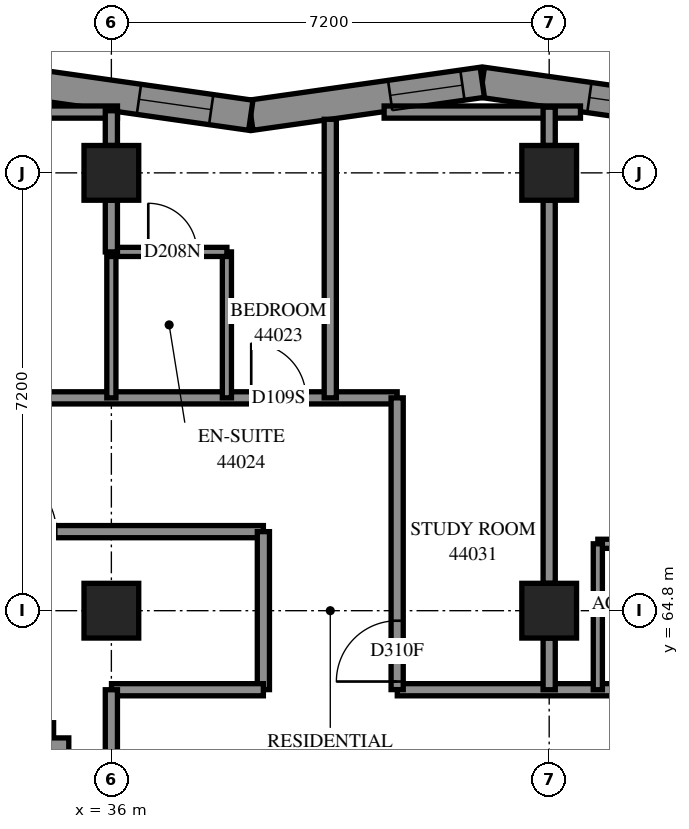
"""IFC4 building model, lengths in metres.
Left out: names, types, materials, properties, quantities, classifications, styles, units other than length and angle.
Written with IfcOpenShell. Run it as: python <this file> out.ifc"""

import sys

from ifc_helpers import new_model, si_unit, direction, frame, frame_2d, origin, origin_2d, place, context, subcontext, project, spatial, polyline, rectangle, outline, extrude, element, fill, save


model = new_model("IFC4")
c1 = context("Model", 3, precision=1e-05, world=origin(), true_north=direction((0.0, 1.0)))
c2 = subcontext(c1, "Body", "Model", "MODEL_VIEW")
j1 = project(units=[si_unit("LENGTHUNIT", "METRE"), si_unit("PLANEANGLEUNIT", "RADIAN")], contexts=[c1])
p1 = place(None, origin())
s1 = spatial("IfcSite", under=j1, at=p1, CompositionType="ELEMENT")
p2 = place(p1, origin())
s2 = spatial("IfcBuilding", under=s1, at=p2, CompositionType="ELEMENT")
p3 = place(p2, frame((0.0, 0.0, 162.6)))
s3 = spatial("IfcBuildingStorey", under=s2, at=p3, CompositionType="ELEMENT", Elevation=162.6)
for number, where, z_axis, x_axis in (
    (1, (36.0, 64.8, 0.0), (0.0, 0.0, 1.0), (1.0, 0.0, 0.0)),
    (2, (36.0, 72.0, 0.0), (0.0, 0.0, 1.0), (1.0, 0.0, 0.0)),
    (3, (43.2, 64.8, 0.0), (0.0, 0.0, 1.0), (1.0, 0.0, 0.0)),
    (4, (43.2, 72.0, 0.0), (0.0, 0.0, 1.0), (1.0, 0.0, 0.0)),
):
    element("IfcColumn", number, at=place(p3, frame(where, z_axis=z_axis, x_axis=x_axis)), inside=s3, PredefinedType="COLUMN", context=c2, shape_type="SweptSolid", body=[
        extrude(rectangle(XDim=0.9, YDim=0.9, at=origin_2d()), origin(), (0.0, 0.0, 1.0), 3.1),
    ])
p4 = place(p3, frame((45.907, 72.948, 0.0), z_axis=(0.0, 0.0, 1.0), x_axis=(-0.9900175106, 0.1409444172, 0.0)))
e5 = element("IfcWall", 5, at=p4, inside=s3, PredefinedType="SOLIDWALL", context=c2, shape_type="SweptSolid", body=[
    extrude(outline(polyline([(0.036, -0.25), (3.881, -0.25), (3.81, 0.25), (-0.036, 0.25), (0.036, -0.25)])), origin(), (0.0, 0.0, 1.0), 3.1),
])
p5 = place(p4, frame((0.867, 0.0, 0.45)))
e6 = element("IfcOpeningElement", 6, at=p5, cuts=e5, PredefinedType="OPENING", context=c2, shape_type="SweptSolid", body=[
    extrude(rectangle(XDim=1.2, YDim=2.5, at=frame_2d((0.6, 1.25))), frame((0.0, 0.26, 0.0), z_axis=(0.0, -1.0, 0.0), x_axis=(1.0, 0.0, 0.0)), (0.0, 0.0, 1.0), 0.52),
])
p6 = place(p3, frame((42.1, 73.49, 0.0), z_axis=(0.0, 0.0, 1.0), x_axis=(-0.990016994, -0.1409480459, 0.0)))
e7 = element("IfcWall", 7, at=p6, inside=s3, PredefinedType="SOLIDWALL", context=c2, shape_type="SweptSolid", body=[
    extrude(outline(polyline([(-0.036, -0.25), (3.81, -0.25), (3.881, 0.25), (0.036, 0.25), (-0.036, -0.25)])), origin(), (0.0, 0.0, 1.0), 3.1),
])
p7 = place(p6, frame((0.33, 0.0, 0.45)))
e8 = element("IfcOpeningElement", 8, at=p7, cuts=e7, PredefinedType="OPENING", context=c2, shape_type="SweptSolid", body=[
    extrude(rectangle(XDim=1.2, YDim=2.5, at=frame_2d((0.6, 1.25))), frame((0.0, 0.26, 0.0), z_axis=(0.0, -1.0, 0.0), x_axis=(1.0, 0.0, 0.0)), (0.0, 0.0, 1.0), 0.52),
])
p8 = place(p3, frame((38.293, 72.948, 0.0), z_axis=(0.0, 0.0, 1.0), x_axis=(-0.990016994, 0.1409480459, 0.0)))
e9 = element("IfcWall", 9, at=p8, inside=s3, PredefinedType="SOLIDWALL", context=c2, shape_type="SweptSolid", body=[
    extrude(outline(polyline([(0.036, -0.25), (3.881, -0.25), (3.81, 0.25), (-0.036, 0.25), (0.036, -0.25)])), origin(), (0.0, 0.0, 1.0), 3.1),
])
p9 = place(p8, frame((0.658, 0.0, 0.45)))
e10 = element("IfcOpeningElement", 10, at=p9, cuts=e9, PredefinedType="OPENING", context=c2, shape_type="SweptSolid", body=[
    extrude(rectangle(XDim=1.2, YDim=2.5, at=frame_2d((0.6, 1.25))), frame((0.0, 0.26, 0.0), z_axis=(0.0, -1.0, 0.0), x_axis=(1.0, 0.0, 0.0)), (0.0, 0.0, 1.0), 0.52),
])
p10 = place(p3, frame((19.508, 62.708, 0.0), z_axis=(0.0, 0.0, 1.0), x_axis=(1.0, 0.0, 0.0)))
e11 = element("IfcWall", 11, at=p10, inside=s3, PredefinedType="SOLIDWALL", context=c2, shape_type="SweptSolid", body=[
    extrude(outline(polyline([(-0.25, -0.25), (15.292, -0.25), (15.792, 0.25), (0.25, 0.25), (-0.25, -0.25)])), origin(), (0.0, 0.0, 1.0), 3.1),
])
p11 = place(p10, frame((2.492, 0.0, 0.45)))
e12 = element("IfcOpeningElement", 12, at=p11, cuts=e11, PredefinedType="OPENING", context=c2, shape_type="SweptSolid", body=[
    extrude(rectangle(XDim=2.8, YDim=2.5, at=frame_2d((1.4, 1.25))), frame((0.0, 0.26, 0.0), z_axis=(0.0, -1.0, 0.0), x_axis=(1.0, 0.0, 0.0)), (0.0, 0.0, 1.0), 0.52),
])
p12 = place(p10, frame((6.092, 0.0, 0.45)))
e13 = element("IfcOpeningElement", 13, at=p12, cuts=e11, PredefinedType="OPENING", context=c2, shape_type="SweptSolid", body=[
    extrude(rectangle(XDim=2.8, YDim=2.5, at=frame_2d((1.4, 1.25))), frame((0.0, 0.26, 0.0), z_axis=(0.0, -1.0, 0.0), x_axis=(1.0, 0.0, 0.0)), (0.0, 0.0, 1.0), 0.52),
])
p13 = place(p10, frame((9.442, 0.0, 0.45)))
e14 = element("IfcOpeningElement", 14, at=p13, cuts=e11, PredefinedType="OPENING", context=c2, shape_type="SweptSolid", body=[
    extrude(rectangle(XDim=2.8, YDim=2.5, at=frame_2d((1.4, 1.25))), frame((0.0, 0.26, 0.0), z_axis=(0.0, -1.0, 0.0), x_axis=(1.0, 0.0, 0.0)), (0.0, 0.0, 1.0), 0.52),
])
p14 = place(p10, frame((0.671, 0.0, 0.45)))
e15 = element("IfcOpeningElement", 15, at=p14, cuts=e11, PredefinedType="OPENING", context=c2, shape_type="SweptSolid", body=[
    extrude(rectangle(XDim=1.2, YDim=2.5, at=frame_2d((0.6, 1.25))), frame((0.0, 0.26, 0.0), z_axis=(0.0, -1.0, 0.0), x_axis=(1.0, 0.0, 0.0)), (0.0, 0.0, 1.0), 0.52),
])
p15 = place(p10, frame((13.517, 0.0, 0.45)))
e16 = element("IfcOpeningElement", 16, at=p15, cuts=e11, PredefinedType="OPENING", context=c2, shape_type="SweptSolid", body=[
    extrude(rectangle(XDim=1.2, YDim=2.5, at=frame_2d((0.6, 1.25))), frame((0.0, 0.26, 0.0), z_axis=(0.0, -1.0, 0.0), x_axis=(1.0, 0.0, 0.0)), (0.0, 0.0, 1.0), 0.52),
])
p16 = place(p3, frame((35.05, 62.708, 0.0), z_axis=(0.0, 0.0, 1.0), x_axis=(0.0, -1.0, 0.0)))
e17 = element("IfcWall", 17, at=p16, inside=s3, PredefinedType="SOLIDWALL", context=c2, shape_type="SweptSolid", body=[
    extrude(outline(polyline([(0.25, -0.25), (6.308, -0.25), (5.808, 0.25), (-0.25, 0.25), (0.25, -0.25)])), origin(), (0.0, 0.0, 1.0), 3.1),
])
p17 = place(p16, frame((1.858, 0.0, 0.7)))
e18 = element("IfcOpeningElement", 18, at=p17, cuts=e17, PredefinedType="OPENING", context=c2, shape_type="SweptSolid", body=[
    extrude(rectangle(XDim=1.8, YDim=2.2, at=frame_2d((0.9, 1.1))), frame((0.0, 0.26, 0.0), z_axis=(0.0, -1.0, 0.0), x_axis=(1.0, 0.0, 0.0)), (0.0, 0.0, 1.0), 0.52),
])
p18 = place(p16, frame((3.908, 0.0, 0.45)))
e19 = element("IfcOpeningElement", 19, at=p18, cuts=e17, PredefinedType="OPENING", context=c2, shape_type="SweptSolid", body=[
    extrude(rectangle(XDim=0.8, YDim=2.5, at=frame_2d((0.4, 1.25))), frame((0.0, 0.26, 0.0), z_axis=(0.0, -1.0, 0.0), x_axis=(1.0, 0.0, 0.0)), (0.0, 0.0, 1.0), 0.52),
])
p19 = place(p3, frame((21.6, 68.3, 0.0), z_axis=(0.0, 0.0, 1.0), x_axis=(1.0, 0.0, 0.0)))
e20 = element("IfcWall", 20, at=p19, inside=s3, PredefinedType="PARTITIONING", context=c2, shape_type="SweptSolid", body=[
    extrude(rectangle(XDim=19.1, YDim=0.2, at=frame_2d((9.55, 0.0))), origin(), (0.0, 0.0, 1.0), 3.1),
])
p20 = place(p19, frame((3.899, 0.0, 0.0)))
e21 = element("IfcOpeningElement", 21, at=p20, cuts=e20, PredefinedType="OPENING", context=c2, shape_type="SweptSolid", body=[
    extrude(rectangle(XDim=0.9, YDim=2.1, at=frame_2d((0.45, 1.05))), frame((0.0, 0.11, 0.0), z_axis=(0.0, -1.0, 0.0), x_axis=(1.0, 0.0, 0.0)), (0.0, 0.0, 1.0), 0.22),
])
p21 = place(p19, frame((11.099, 0.0, 0.0)))
e22 = element("IfcOpeningElement", 22, at=p21, cuts=e20, PredefinedType="OPENING", context=c2, shape_type="SweptSolid", body=[
    extrude(rectangle(XDim=0.9, YDim=2.1, at=frame_2d((0.45, 1.05))), frame((0.0, 0.11, 0.0), z_axis=(0.0, -1.0, 0.0), x_axis=(1.0, 0.0, 0.0)), (0.0, 0.0, 1.0), 0.22),
])
p22 = place(p19, frame((16.7, 0.0, 0.0)))
e23 = element("IfcOpeningElement", 23, at=p22, cuts=e20, PredefinedType="OPENING", context=c2, shape_type="SweptSolid", body=[
    extrude(rectangle(XDim=0.9, YDim=2.1, at=frame_2d((0.45, 1.05))), frame((0.0, 0.11, 0.0), z_axis=(0.0, -1.0, 0.0), x_axis=(1.0, 0.0, 0.0)), (0.0, 0.0, 1.0), 0.22),
])
p23 = place(p3, frame((21.6, 66.1, 0.0), z_axis=(0.0, 0.0, 1.0), x_axis=(1.0, 0.0, 0.0)))
e24 = element("IfcWall", 24, at=p23, inside=s3, PredefinedType="PARTITIONING", context=c2, shape_type="SweptSolid", body=[
    extrude(rectangle(XDim=16.9, YDim=0.2, at=frame_2d((8.45, 0.0))), origin(), (0.0, 0.0, 1.0), 3.1),
])
p24 = place(p23, frame((12.493, 0.0, 0.0)))
e25 = element("IfcOpeningElement", 25, at=p24, cuts=e24, PredefinedType="OPENING", context=c2, shape_type="SweptSolid", body=[
    extrude(rectangle(XDim=1.0, YDim=2.1, at=frame_2d((0.5, 1.05))), frame((0.0, 0.11, 0.0), z_axis=(0.0, -1.0, 0.0), x_axis=(1.0, 0.0, 0.0)), (0.0, 0.0, 1.0), 0.22),
])
p25 = place(p3, frame((40.702, 63.5, 0.0), z_axis=(0.0, 0.0, 1.0), x_axis=(1.0, 0.0, 0.0)))
e26 = element("IfcWall", 26, at=p25, inside=s3, PredefinedType="PARTITIONING", context=c2, shape_type="SweptSolid", body=[
    extrude(rectangle(XDim=14.198, YDim=0.2, at=frame_2d((7.099, 0.0))), origin(), (0.0, 0.0, 1.0), 3.1),
])
p26 = place(p25, frame((6.692, 0.0, 0.0)))
e27 = element("IfcOpeningElement", 27, at=p26, cuts=e26, PredefinedType="OPENING", context=c2, shape_type="SweptSolid", body=[
    extrude(rectangle(XDim=0.9, YDim=2.1, at=frame_2d((0.45, 1.05))), frame((0.0, 0.11, 0.0), z_axis=(0.0, -1.0, 0.0), x_axis=(1.0, 0.0, 0.0)), (0.0, 0.0, 1.0), 0.22),
])
p27 = place(p25, frame((10.25, 0.0, 0.0)))
e28 = element("IfcOpeningElement", 28, at=p27, cuts=e26, PredefinedType="OPENING", context=c2, shape_type="SweptSolid", body=[
    extrude(rectangle(XDim=0.9, YDim=2.1, at=frame_2d((0.45, 1.05))), frame((0.0, 0.11, 0.0), z_axis=(0.0, -1.0, 0.0), x_axis=(1.0, 0.0, 0.0)), (0.0, 0.0, 1.0), 0.22),
])
p28 = place(p3, frame((43.2, 65.25, 0.0), z_axis=(0.0, 0.0, 1.0), x_axis=(0.0, 1.0, 0.0)))
e29 = element("IfcWall", 29, at=p28, inside=s3, PredefinedType="PARTITIONING", context=c2, shape_type="SweptSolid", body=[
    extrude(rectangle(XDim=6.3, YDim=0.2, at=frame_2d((3.15, 0.0))), origin(), (0.0, 0.0, 1.0), 3.1),
])
p29 = place(p3, frame((40.7, 63.502, 0.0), z_axis=(0.0, 0.0, 1.0), x_axis=(0.0, 1.0, 0.0)))
e30 = element("IfcWall", 30, at=p29, inside=s3, PredefinedType="PARTITIONING", context=c2, shape_type="SweptSolid", body=[
    extrude(rectangle(XDim=4.798, YDim=0.2, at=frame_2d((2.399, 0.0))), origin(), (0.0, 0.0, 1.0), 3.1),
])
p30 = place(p29, frame((0.133, 0.0, 0.0)))
e31 = element("IfcOpeningElement", 31, at=p30, cuts=e30, PredefinedType="OPENING", context=c2, shape_type="SweptSolid", body=[
    extrude(rectangle(XDim=1.0, YDim=2.1, at=frame_2d((0.5, 1.05))), frame((0.0, 0.11, 0.0), z_axis=(0.0, -1.0, 0.0), x_axis=(1.0, 0.0, 0.0)), (0.0, 0.0, 1.0), 0.22),
])
p31 = place(p3, frame((39.6, 68.3, 0.0), z_axis=(0.0, 0.0, 1.0), x_axis=(0.0, 1.0, 0.0)))
e32 = element("IfcWall", 32, at=p31, inside=s3, PredefinedType="PARTITIONING", context=c2, shape_type="SweptSolid", body=[
    extrude(rectangle(XDim=4.581, YDim=0.2, at=frame_2d((2.291, 0.0))), origin(), (0.0, 0.0, 1.0), 3.1),
])
p32 = place(p3, frame((40.486, 73.0, 0.0), z_axis=(0.0, 0.0, 1.0), x_axis=(1.0, 0.0, 0.0)))
e33 = element("IfcWall", 33, at=p32, inside=s3, PredefinedType="PARTITIONING", context=c2, shape_type="SweptSolid", body=[
    extrude(rectangle(XDim=3.229, YDim=0.2, at=frame_2d((1.614, 0.0))), origin(), (0.0, 0.0, 1.0), 3.1),
])
p33 = place(p3, frame((32.872, 73.0, 0.0), z_axis=(0.0, 0.0, 1.0), x_axis=(1.0, 0.0, 0.0)))
e34 = element("IfcWall", 34, at=p33, inside=s3, PredefinedType="PARTITIONING", context=c2, shape_type="SweptSolid", body=[
    extrude(rectangle(XDim=3.229, YDim=0.2, at=frame_2d((1.614, 0.0))), origin(), (0.0, 0.0, 1.0), 3.1),
])
p34 = place(p3, frame((44.0, 65.9, 0.0), z_axis=(0.0, 0.0, 1.0), x_axis=(1.0, 0.0, 0.0)))
e35 = element("IfcWall", 35, at=p34, inside=s3, PredefinedType="PARTITIONING", context=c2, shape_type="SweptSolid", body=[
    extrude(rectangle(XDim=3.2, YDim=0.15, at=frame_2d((1.6, 0.0))), origin(), (0.0, 0.0, 1.0), 3.1),
])
p35 = place(p34, frame((1.154, 0.0, 0.0)))
e36 = element("IfcOpeningElement", 36, at=p35, cuts=e35, PredefinedType="OPENING", context=c2, shape_type="SweptSolid", body=[
    extrude(rectangle(XDim=0.8, YDim=2.1, at=frame_2d((0.4, 1.05))), frame((0.0, 0.085, 0.0), z_axis=(0.0, -1.0, 0.0), x_axis=(1.0, 0.0, 0.0)), (0.0, 0.0, 1.0), 0.17),
])
p36 = place(p3, frame((38.5, 63.502, 0.0), z_axis=(0.0, 0.0, 1.0), x_axis=(0.0, 1.0, 0.0)))
e37 = element("IfcWall", 37, at=p36, inside=s3, PredefinedType="PARTITIONING", context=c2, shape_type="SweptSolid", body=[
    extrude(rectangle(XDim=2.598, YDim=0.2, at=frame_2d((1.299, 0.0))), origin(), (0.0, 0.0, 1.0), 3.1),
])
p37 = place(p3, frame((36.002, 63.5, 0.0), z_axis=(0.0, 0.0, 1.0), x_axis=(1.0, 0.0, 0.0)))
e38 = element("IfcWall", 38, at=p37, inside=s3, PredefinedType="PARTITIONING", context=c2, shape_type="SweptSolid", body=[
    extrude(rectangle(XDim=2.498, YDim=0.2, at=frame_2d((1.249, 0.0))), origin(), (0.0, 0.0, 1.0), 3.1),
])
for number, where, z_axis, x_axis in (
    (39, (37.9, 68.3, 0.0), (0.0, 0.0, 1.0), (0.0, 1.0, 0.0)),
    (40, (36.0, 68.3, 0.0), (0.0, 0.0, 1.0), (0.0, 1.0, 0.0)),
    (41, (44.0, 63.5, 0.0), (0.0, 0.0, 1.0), (0.0, 1.0, 0.0)),
):
    element("IfcWall", number, at=place(p3, frame(where, z_axis=z_axis, x_axis=x_axis)), inside=s3, PredefinedType="PARTITIONING", context=c2, shape_type="SweptSolid", body=[
        extrude(rectangle(XDim=2.4, YDim=0.15, at=frame_2d((1.2, 0.0))), origin(), (0.0, 0.0, 1.0), 3.1),
    ])
p38 = place(p3, frame((36.0, 61.3, 0.0), z_axis=(0.0, 0.0, 1.0), x_axis=(0.0, 1.0, 0.0)))
e42 = element("IfcWall", 42, at=p38, inside=s3, PredefinedType="PARTITIONING", context=c2, shape_type="SweptSolid", body=[
    extrude(rectangle(XDim=2.2, YDim=0.2, at=frame_2d((1.1, 0.0))), origin(), (0.0, 0.0, 1.0), 2.6),
])
p39 = place(p3, frame((36.0, 70.7, 0.0), z_axis=(0.0, 0.0, 1.0), x_axis=(1.0, 0.0, 0.0)))
e43 = element("IfcWall", 43, at=p39, inside=s3, PredefinedType="PARTITIONING", context=c2, shape_type="SweptSolid", body=[
    extrude(rectangle(XDim=1.9, YDim=0.15, at=frame_2d((0.95, 0.0))), origin(), (0.0, 0.0, 1.0), 3.1),
])
p40 = place(p39, frame((0.607, 0.0, 0.0)))
e44 = element("IfcOpeningElement", 44, at=p40, cuts=e43, PredefinedType="OPENING", context=c2, shape_type="SweptSolid", body=[
    extrude(rectangle(XDim=0.8, YDim=2.1, at=frame_2d((0.4, 1.05))), frame((0.0, 0.085, 0.0), z_axis=(0.0, -1.0, 0.0), x_axis=(1.0, 0.0, 0.0)), (0.0, 0.0, 1.0), 0.17),
])
for number, where, z_axis, x_axis in (
    (45, (36.0, 70.7, 0.0), (0.0, 0.0, 1.0), (0.0, 1.0, 0.0)),
    (46, (43.2, 63.5, 0.0), (0.0, 0.0, 1.0), (0.0, 1.0, 0.0)),
):
    element("IfcWall", number, at=place(p3, frame(where, z_axis=z_axis, x_axis=x_axis)), inside=s3, PredefinedType="PARTITIONING", context=c2, shape_type="SweptSolid", body=[
        extrude(rectangle(XDim=0.85, YDim=0.2, at=frame_2d((0.425, 0.0))), origin(), (0.0, 0.0, 1.0), 3.1),
    ])
p41 = place(p3, frame((43.2, 72.45, 0.0), z_axis=(0.0, 0.0, 1.0), x_axis=(0.0, 1.0, 0.0)))
e47 = element("IfcWall", 47, at=p41, inside=s3, PredefinedType="PARTITIONING", context=c2, shape_type="SweptSolid", body=[
    extrude(rectangle(XDim=0.63, YDim=0.2, at=frame_2d((0.315, 0.0))), origin(), (0.0, 0.0, 1.0), 3.1),
])
p42 = place(p3, frame((36.0, 72.45, 0.0), z_axis=(0.0, 0.0, 1.0), x_axis=(0.0, 1.0, 0.0)))
e48 = element("IfcWall", 48, at=p42, inside=s3, PredefinedType="PARTITIONING", context=c2, shape_type="SweptSolid", body=[
    extrude(rectangle(XDim=0.571, YDim=0.2, at=frame_2d((0.286, 0.0))), origin(), (0.0, 0.0, 1.0), 3.1),
])
p43 = place(p5, origin())
e49 = element("IfcWindow", 49, at=p43, inside=s3, PartitioningType="SINGLE_PANEL", PredefinedType="WINDOW", context=c2, shape_type="SweptSolid", body=[
    extrude(rectangle(XDim=1.2, YDim=2.5, at=frame_2d((0.6, 1.25))), frame((0.0, 0.18, 0.0), z_axis=(0.0, -1.0, 0.0), x_axis=(1.0, 0.0, 0.0)), (0.0, 0.0, 1.0), 0.06),
])
fill(e6, e49)
p44 = place(p7, origin())
e50 = element("IfcWindow", 50, at=p44, inside=s3, PartitioningType="SINGLE_PANEL", PredefinedType="WINDOW", context=c2, shape_type="SweptSolid", body=[
    extrude(rectangle(XDim=1.2, YDim=2.5, at=frame_2d((0.6, 1.25))), frame((0.0, 0.14, 0.0), z_axis=(0.0, -1.0, 0.0), x_axis=(1.0, 0.0, 0.0)), (0.0, 0.0, 1.0), 0.06),
])
fill(e8, e50)
p45 = place(p9, origin())
e51 = element("IfcWindow", 51, at=p45, inside=s3, PartitioningType="SINGLE_PANEL", PredefinedType="WINDOW", context=c2, shape_type="SweptSolid", body=[
    extrude(rectangle(XDim=1.2, YDim=2.5, at=frame_2d((0.6, 1.25))), frame((0.0, 0.18, 0.0), z_axis=(0.0, -1.0, 0.0), x_axis=(1.0, 0.0, 0.0)), (0.0, 0.0, 1.0), 0.06),
])
fill(e10, e51)
p46 = place(p22, origin())
e52 = element("IfcDoor", 52, at=p46, inside=s3, OperationType="SINGLE_SWING_RIGHT", PredefinedType="DOOR", context=c2, shape_type="SweptSolid", body=[
    extrude(rectangle(XDim=0.9, YDim=2.1, at=frame_2d((0.45, 1.05))), frame((0.0, 0.025, 0.0), z_axis=(0.0, -1.0, 0.0), x_axis=(1.0, 0.0, 0.0)), (0.0, 0.0, 1.0), 0.05),
])
fill(e23, e52)
p47 = place(p40, origin())
e53 = element("IfcDoor", 53, at=p47, inside=s3, OperationType="SINGLE_SWING_RIGHT", PredefinedType="DOOR", context=c2, shape_type="SweptSolid", body=[
    extrude(rectangle(XDim=0.8, YDim=2.1, at=frame_2d((0.4, 1.05))), frame((0.0, 0.025, 0.0), z_axis=(0.0, -1.0, 0.0), x_axis=(1.0, 0.0, 0.0)), (0.0, 0.0, 1.0), 0.05),
])
fill(e44, e53)
p48 = place(p24, origin())
e54 = element("IfcDoor", 54, at=p48, inside=s3, OperationType="SINGLE_SWING_RIGHT", PredefinedType="DOOR", context=c2, shape_type="SweptSolid", body=[
    extrude(rectangle(XDim=1.0, YDim=2.1, at=frame_2d((0.5, 1.05))), frame((0.0, 0.025, 0.0), z_axis=(0.0, -1.0, 0.0), x_axis=(1.0, 0.0, 0.0)), (0.0, 0.0, 1.0), 0.05),
])
fill(e25, e54)
p49 = place(p30, origin())
e55 = element("IfcDoor", 55, at=p49, inside=s3, OperationType="SINGLE_SWING_LEFT", PredefinedType="DOOR", context=c2, shape_type="SweptSolid", body=[
    extrude(rectangle(XDim=1.0, YDim=2.1, at=frame_2d((0.5, 1.05))), frame((0.0, 0.025, 0.0), z_axis=(0.0, -1.0, 0.0), x_axis=(1.0, 0.0, 0.0)), (0.0, 0.0, 1.0), 0.05),
])
fill(e31, e55)
save(model, sys.argv[1])
